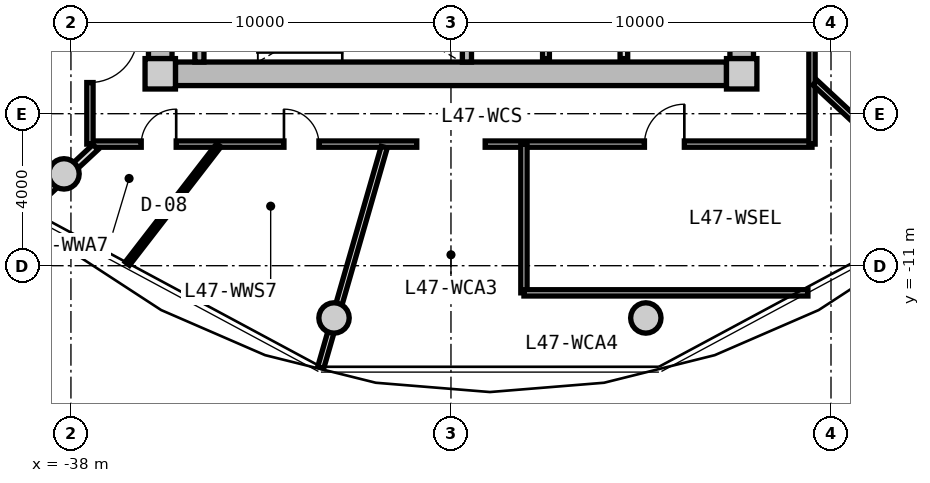
"""IFC4 building model, lengths in metres.
Left out: names, types, materials, properties, quantities, classifications, styles, units other than length and angle.
Written with IfcOpenShell. Run it as: python <this file> out.ifc"""

import sys

from ifc_helpers import new_model, si_unit, direction, frame, frame_2d, origin, origin_2d, place, context, subcontext, project, spatial, rectangle, circle, extrude, source, transform, mapped, element, fill, save


model = new_model("IFC4")
c1 = context("Model", 3, precision=1e-05, world=origin(), true_north=direction((0.0, 1.0)))
c2 = subcontext(c1, "Body", "Model", "MODEL_VIEW")
j1 = project(units=[si_unit("LENGTHUNIT", "METRE"), si_unit("PLANEANGLEUNIT", "RADIAN")], contexts=[c1])
p1 = place(None, origin())
s1 = spatial("IfcSite", under=j1, at=p1, CompositionType="ELEMENT")
p2 = place(p1, origin())
s2 = spatial("IfcBuilding", under=s1, at=p2, CompositionType="ELEMENT")
p3 = place(p2, frame((0.0, 0.0, 152.6)))
s3 = spatial("IfcBuildingStorey", under=s2, at=p3, CompositionType="ELEMENT", Elevation=152.6)
m1 = source(origin(), c2, "Body", "SweptSolid", [
    extrude(rectangle(XDim=0.8, YDim=0.8, at=origin_2d()), origin(), (0.0, 0.0, 1.0), 3.05),
])
for number, where, z_axis, x_axis in (
    (1, (-35.65, -5.95, 0.0), (0.0, 0.0, 1.0), (1.0, 0.0, 0.0)),
    (2, (-20.35, -5.95, 0.0), (0.0, 0.0, 1.0), (1.0, 0.0, 0.0)),
):
    element("IfcColumn", number, at=place(p3, frame(where, z_axis=z_axis, x_axis=x_axis)), inside=s3, PredefinedType="COLUMN", context=c2, shape_type="MappedRepresentation", body=[
        mapped(m1, transform((0.0, 0.0, 0.0), x_axis=(1.0, 0.0, 0.0), y_axis=(0.0, 1.0, 0.0), z_axis=(0.0, 0.0, 1.0), scale=1.0)),
    ])
m2 = source(origin(), c2, "Body", "SweptSolid", [
    extrude(rectangle(XDim=14.5, YDim=0.62, at=frame_2d((7.25, 0.0))), origin(), (0.0, 0.0, 1.0), 2.81),
])
p4 = place(p3, frame((-20.75, -5.95, 0.0), z_axis=(0.0, 0.0, 1.0), x_axis=(-1.0, 0.0, 0.0)))
e3 = element("IfcWall", 3, at=p4, inside=s3, PredefinedType="SHEAR", context=c2, shape_type="MappedRepresentation", body=[
    mapped(m2, transform((0.0, 0.0, 0.0), x_axis=(1.0, 0.0, 0.0), y_axis=(0.0, 1.0, 0.0), z_axis=(0.0, 0.0, 1.0), scale=1.0)),
])
m3 = source(origin(), c2, "Body", "SweptSolid", [
    extrude(rectangle(XDim=11.1, YDim=0.62, at=frame_2d((5.55, 0.0))), origin(), (0.0, 0.0, 1.0), 2.81),
])
p5 = place(p3, frame((-35.65, -5.55, 0.0), z_axis=(0.0, 0.0, 1.0), x_axis=(0.0, 1.0, 0.0)))
e4 = element("IfcWall", 4, at=p5, inside=s3, PredefinedType="SHEAR", context=c2, shape_type="MappedRepresentation", body=[
    mapped(m3, transform((0.0, 0.0, 0.0), x_axis=(1.0, 0.0, 0.0), y_axis=(0.0, 1.0, 0.0), z_axis=(0.0, 0.0, 1.0), scale=1.0)),
])
p6 = place(p5, frame((3.8, 0.0, 0.0)))
e5 = element("IfcOpeningElement", 5, at=p6, cuts=e4, PredefinedType="OPENING", context=c2, shape_type="SweptSolid", body=[
    extrude(rectangle(XDim=1.2, YDim=2.15, at=frame_2d((0.6, 1.075))), frame((0.0, 0.32, 0.0), z_axis=(0.0, -1.0, 0.0), x_axis=(1.0, 0.0, 0.0)), (0.0, 0.0, 1.0), 0.64),
])
p7 = place(p3, frame((-20.35, 5.55, 0.0), z_axis=(0.0, 0.0, 1.0), x_axis=(0.0, -1.0, 0.0)))
e6 = element("IfcWall", 6, at=p7, inside=s3, PredefinedType="SHEAR", context=c2, shape_type="MappedRepresentation", body=[
    mapped(m3, transform((0.0, 0.0, 0.0), x_axis=(1.0, 0.0, 0.0), y_axis=(0.0, 1.0, 0.0), z_axis=(0.0, 0.0, 1.0), scale=1.0)),
])
p8 = place(p7, frame((5.65, 0.0, 0.0)))
e7 = element("IfcOpeningElement", 7, at=p8, cuts=e6, PredefinedType="OPENING", context=c2, shape_type="SweptSolid", body=[
    extrude(rectangle(XDim=1.2, YDim=2.15, at=frame_2d((0.6, 1.075))), frame((0.0, 0.32, 0.0), z_axis=(0.0, -1.0, 0.0), x_axis=(1.0, 0.0, 0.0)), (0.0, 0.0, 1.0), 0.64),
])
p9 = place(p7, frame((9.3, 0.0, 0.0)))
e8 = element("IfcOpeningElement", 8, at=p9, cuts=e6, PredefinedType="OPENING", context=c2, shape_type="SweptSolid", body=[
    extrude(rectangle(XDim=1.0, YDim=2.1, at=frame_2d((0.5, 1.05))), frame((0.0, 0.32, 0.0), z_axis=(0.0, -1.0, 0.0), x_axis=(1.0, 0.0, 0.0)), (0.0, 0.0, 1.0), 0.64),
])
m4 = source(origin(), c2, "Body", "SweptSolid", [
    extrude(circle(Radius=0.4, at=origin_2d()), origin(), (0.0, 0.0, 1.0), 3.05),
])
for number, where, z_axis, x_axis in (
    (9, (-38.183, -8.584, 0.0), (0.0, 0.0, 1.0), (1.0, 0.0, 0.0)),
    (10, (-31.077, -12.375, 0.0), (0.0, 0.0, 1.0), (1.0, 0.0, 0.0)),
    (11, (-22.873, -12.375, 0.0), (0.0, 0.0, 1.0), (1.0, 0.0, 0.0)),
):
    element("IfcColumn", number, at=place(p3, frame(where, z_axis=z_axis, x_axis=x_axis)), inside=s3, PredefinedType="COLUMN", context=c2, shape_type="MappedRepresentation", body=[
        mapped(m4, transform((0.0, 0.0, 0.0), x_axis=(1.0, 0.0, 0.0), y_axis=(0.0, 1.0, 0.0), z_axis=(0.0, 0.0, 1.0), scale=1.0)),
    ])
m5 = source(origin(), c2, "Body", "SweptSolid", [
    extrude(rectangle(XDim=3.19, YDim=0.24, at=frame_2d((1.595, 0.0))), origin(), (0.0, 0.0, 1.0), 2.81),
])
for number, where, z_axis, x_axis in (
    (12, (-34.62, -5.64, 0.0), (0.0, 0.0, 1.0), (0.0, 1.0, 0.0)),
    (13, (-27.58, -5.64, 0.0), (0.0, 0.0, 1.0), (0.0, 1.0, 0.0)),
):
    element("IfcWall", number, at=place(p3, frame(where, z_axis=z_axis, x_axis=x_axis)), inside=s3, PredefinedType="PARTITIONING", context=c2, shape_type="MappedRepresentation", body=[
        mapped(m5, transform((0.0, 0.0, 0.0), x_axis=(1.0, 0.0, 0.0), y_axis=(0.0, 1.0, 0.0), z_axis=(0.0, 0.0, 1.0), scale=1.0)),
    ])
m6 = source(origin(), c2, "Body", "SweptSolid", [
    extrude(rectangle(XDim=3.8, YDim=0.2, at=frame_2d((1.9, 0.0))), origin(), (0.0, 0.0, 1.0), 2.795),
])
p10 = place(p3, frame((-23.45, -5.55, 0.0), z_axis=(0.0, 0.0, 1.0), x_axis=(0.0, 1.0, 0.0)))
e14 = element("IfcWall", 14, at=p10, inside=s3, PredefinedType="PARTITIONING", context=c2, shape_type="MappedRepresentation", body=[
    mapped(m6, transform((0.0, 0.0, 0.0), x_axis=(1.0, 0.0, 0.0), y_axis=(0.0, 1.0, 0.0), z_axis=(0.0, 0.0, 1.0), scale=1.0)),
])
m7 = source(origin(), c2, "Body", "SweptSolid", [
    extrude(rectangle(XDim=3.22, YDim=0.18, at=frame_2d((1.61, 0.0))), origin(), (0.0, 0.0, 1.0), 2.795),
])
p11 = place(p3, frame((-25.5, -5.55, 0.0), z_axis=(0.0, 0.0, 1.0), x_axis=(0.0, 1.0, 0.0)))
e15 = element("IfcWall", 15, at=p11, inside=s3, PredefinedType="PARTITIONING", context=c2, shape_type="MappedRepresentation", body=[
    mapped(m7, transform((0.0, 0.0, 0.0), x_axis=(1.0, 0.0, 0.0), y_axis=(0.0, 1.0, 0.0), z_axis=(0.0, 0.0, 1.0), scale=1.0)),
])
m8 = source(origin(), c2, "Body", "SweptSolid", [
    extrude(rectangle(XDim=8.6, YDim=0.165, at=frame_2d((4.3, 0.0))), origin(), (0.0, 0.0, 1.0), 2.795),
])
p12 = place(p3, frame((-18.5, -7.8, 0.0), z_axis=(0.0, 0.0, 1.0), x_axis=(-1.0, 0.0, 0.0)))
e16 = element("IfcWall", 16, at=p12, inside=s3, PredefinedType="PARTITIONING", context=c2, shape_type="MappedRepresentation", body=[
    mapped(m8, transform((0.0, 0.0, 0.0), x_axis=(1.0, 0.0, 0.0), y_axis=(0.0, 1.0, 0.0), z_axis=(0.0, 0.0, 1.0), scale=1.0)),
])
p13 = place(p12, frame((3.359, 0.0, 0.0)))
e17 = element("IfcOpeningElement", 17, at=p13, cuts=e16, PredefinedType="OPENING", context=c2, shape_type="SweptSolid", body=[
    extrude(rectangle(XDim=1.05, YDim=2.15, at=frame_2d((0.525, 1.075))), frame((0.0, 0.093, 0.0), z_axis=(0.0, -1.0, 0.0), x_axis=(1.0, 0.0, 0.0)), (0.0, 0.0, 1.0), 0.185),
])
p14 = place(p3, frame((-28.9, -7.8, 0.0), z_axis=(0.0, 0.0, 1.0), x_axis=(-1.0, 0.0, 0.0)))
e18 = element("IfcWall", 18, at=p14, inside=s3, PredefinedType="PARTITIONING", context=c2, shape_type="MappedRepresentation", body=[
    mapped(m8, transform((0.0, 0.0, 0.0), x_axis=(1.0, 0.0, 0.0), y_axis=(0.0, 1.0, 0.0), z_axis=(0.0, 0.0, 1.0), scale=1.0)),
])
p15 = place(p14, frame((6.33, 0.0, 0.0)))
e19 = element("IfcOpeningElement", 19, at=p15, cuts=e18, PredefinedType="OPENING", context=c2, shape_type="SweptSolid", body=[
    extrude(rectangle(XDim=0.92, YDim=2.1, at=frame_2d((0.46, 1.05))), frame((0.0, 0.093, 0.0), z_axis=(0.0, -1.0, 0.0), x_axis=(1.0, 0.0, 0.0)), (0.0, 0.0, 1.0), 0.185),
])
p16 = place(p14, frame((2.575, 0.0, 0.0)))
e20 = element("IfcOpeningElement", 20, at=p16, cuts=e18, PredefinedType="OPENING", context=c2, shape_type="SweptSolid", body=[
    extrude(rectangle(XDim=0.92, YDim=2.1, at=frame_2d((0.46, 1.05))), frame((0.0, 0.093, 0.0), z_axis=(0.0, -1.0, 0.0), x_axis=(1.0, 0.0, 0.0)), (0.0, 0.0, 1.0), 0.185),
])
m9 = source(origin(), c2, "Body", "SweptSolid", [
    extrude(rectangle(XDim=15.6, YDim=0.165, at=frame_2d((7.8, 0.0))), origin(), (0.0, 0.0, 1.0), 2.795),
])
p17 = place(p3, frame((-37.5, -7.8, 0.0), z_axis=(0.0, 0.0, 1.0), x_axis=(0.0, 1.0, 0.0)))
e21 = element("IfcWall", 21, at=p17, inside=s3, PredefinedType="PARTITIONING", context=c2, shape_type="MappedRepresentation", body=[
    mapped(m9, transform((0.0, 0.0, 0.0), x_axis=(1.0, 0.0, 0.0), y_axis=(0.0, 1.0, 0.0), z_axis=(0.0, 0.0, 1.0), scale=1.0)),
])
p18 = place(p17, frame((13.16, 0.0, 0.0)))
e22 = element("IfcOpeningElement", 22, at=p18, cuts=e21, PredefinedType="OPENING", context=c2, shape_type="SweptSolid", body=[
    extrude(rectangle(XDim=1.25, YDim=2.2, at=frame_2d((0.625, 1.1))), frame((0.0, 0.093, 0.0), z_axis=(0.0, -1.0, 0.0), x_axis=(1.0, 0.0, 0.0)), (0.0, 0.0, 1.0), 0.185),
])
p19 = place(p17, frame((7.757, 0.0, 0.0)))
e23 = element("IfcOpeningElement", 23, at=p19, cuts=e21, PredefinedType="OPENING", context=c2, shape_type="SweptSolid", body=[
    extrude(rectangle(XDim=1.25, YDim=2.2, at=frame_2d((0.625, 1.1))), frame((0.0, 0.093, 0.0), z_axis=(0.0, -1.0, 0.0), x_axis=(1.0, 0.0, 0.0)), (0.0, 0.0, 1.0), 0.185),
])
p20 = place(p17, frame((1.62, 0.0, 0.0)))
e24 = element("IfcOpeningElement", 24, at=p20, cuts=e21, PredefinedType="OPENING", context=c2, shape_type="SweptSolid", body=[
    extrude(rectangle(XDim=1.25, YDim=2.2, at=frame_2d((0.625, 1.1))), frame((0.0, 0.093, 0.0), z_axis=(0.0, -1.0, 0.0), x_axis=(1.0, 0.0, 0.0)), (0.0, 0.0, 1.0), 0.185),
])
p21 = place(p3, frame((-18.5, 7.8, 0.0), z_axis=(0.0, 0.0, 1.0), x_axis=(0.0, -1.0, 0.0)))
e25 = element("IfcWall", 25, at=p21, inside=s3, PredefinedType="PARTITIONING", context=c2, shape_type="MappedRepresentation", body=[
    mapped(m9, transform((0.0, 0.0, 0.0), x_axis=(1.0, 0.0, 0.0), y_axis=(0.0, 1.0, 0.0), z_axis=(0.0, 0.0, 1.0), scale=1.0)),
])
p22 = place(p21, frame((8.314, 0.0, 0.0)))
e26 = element("IfcOpeningElement", 26, at=p22, cuts=e25, PredefinedType="OPENING", context=c2, shape_type="SweptSolid", body=[
    extrude(rectangle(XDim=1.25, YDim=2.2, at=frame_2d((0.625, 1.1))), frame((0.0, 0.093, 0.0), z_axis=(0.0, -1.0, 0.0), x_axis=(1.0, 0.0, 0.0)), (0.0, 0.0, 1.0), 0.185),
])
p23 = place(p21, frame((1.515, 0.0, 0.0)))
e27 = element("IfcOpeningElement", 27, at=p23, cuts=e25, PredefinedType="OPENING", context=c2, shape_type="SweptSolid", body=[
    extrude(rectangle(XDim=1.05, YDim=2.15, at=frame_2d((0.525, 1.075))), frame((0.0, 0.093, 0.0), z_axis=(0.0, -1.0, 0.0), x_axis=(1.0, 0.0, 0.0)), (0.0, 0.0, 1.0), 0.185),
])
m10 = source(origin(), c2, "Body", "SweptSolid", [
    extrude(rectangle(XDim=6.035, YDim=0.165, at=frame_2d((3.018, 0.0))), origin(), (0.0, 0.0, 1.0), 2.345),
])
p24 = place(p3, frame((-29.756, -7.88, 0.0), z_axis=(0.0, 0.0, 1.0), x_axis=(-0.276809454862, -0.960924828329, 0.0)))
e28 = element("IfcWall", 28, at=p24, inside=s3, PredefinedType="PARTITIONING", context=c2, shape_type="MappedRepresentation", body=[
    mapped(m10, transform((0.0, 0.0, 0.0), x_axis=(1.0, 0.0, 0.0), y_axis=(0.0, 1.0, 0.0), z_axis=(0.0, 0.0, 1.0), scale=1.0)),
])
m11 = source(origin(), c2, "Body", "SweptSolid", [
    extrude(rectangle(XDim=4.927, YDim=0.165, at=frame_2d((2.463, 0.0))), origin(), (0.0, 0.0, 1.0), 2.345),
])
p25 = place(p3, frame((-18.42, -6.183, 0.0), z_axis=(0.0, 0.0, 1.0), x_axis=(0.732191335987, -0.681098999783, 0.0)))
e29 = element("IfcWall", 29, at=p25, inside=s3, PredefinedType="PARTITIONING", context=c2, shape_type="MappedRepresentation", body=[
    mapped(m11, transform((0.0, 0.0, 0.0), x_axis=(1.0, 0.0, 0.0), y_axis=(0.0, 1.0, 0.0), z_axis=(0.0, 0.0, 1.0), scale=1.0)),
])
m12 = source(origin(), c2, "Body", "SweptSolid", [
    extrude(rectangle(XDim=3.915, YDim=0.165, at=frame_2d((1.957, 0.0))), origin(), (0.0, 0.0, 1.0), 2.795),
])
p26 = place(p3, frame((-26.08, -11.715, 0.0), z_axis=(0.0, 0.0, 1.0), x_axis=(0.0, 1.0, 0.0)))
e30 = element("IfcWall", 30, at=p26, inside=s3, PredefinedType="PARTITIONING", context=c2, shape_type="MappedRepresentation", body=[
    mapped(m12, transform((0.0, 0.0, 0.0), x_axis=(1.0, 0.0, 0.0), y_axis=(0.0, 1.0, 0.0), z_axis=(0.0, 0.0, 1.0), scale=1.0)),
])
m13 = source(origin(), c2, "Body", "SweptSolid", [
    extrude(rectangle(XDim=7.473, YDim=0.165, at=frame_2d((3.737, 0.0))), origin(), (0.0, 0.0, 1.0), 2.795),
])
p27 = place(p3, frame((-26.08, -11.715, 0.0), z_axis=(0.0, 0.0, 1.0), x_axis=(1.0, 0.0, 0.0)))
e31 = element("IfcWall", 31, at=p27, inside=s3, PredefinedType="PARTITIONING", context=c2, shape_type="MappedRepresentation", body=[
    mapped(m13, transform((0.0, 0.0, 0.0), x_axis=(1.0, 0.0, 0.0), y_axis=(0.0, 1.0, 0.0), z_axis=(0.0, 0.0, 1.0), scale=1.0)),
])
m14 = source(origin(), c2, "Body", "SweptSolid", [
    extrude(rectangle(XDim=2.435, YDim=0.19, at=frame_2d((1.217, 0.0))), origin(), (0.0, 0.0, 1.0), 2.345),
])
p28 = place(p3, frame((-37.354, -7.88, 0.0), z_axis=(0.0, 0.0, 1.0), x_axis=(-0.732164643118, -0.681127693878, 0.0)))
e32 = element("IfcWall", 32, at=p28, inside=s3, PredefinedType="PARTITIONING", context=c2, shape_type="MappedRepresentation", body=[
    mapped(m14, transform((0.0, 0.0, 0.0), x_axis=(1.0, 0.0, 0.0), y_axis=(0.0, 1.0, 0.0), z_axis=(0.0, 0.0, 1.0), scale=1.0)),
])
m15 = source(origin(), c2, "Body", "SweptSolid", [
    extrude(rectangle(XDim=3.937, YDim=0.14, at=frame_2d((1.968, 0.0))), origin(), (0.0, 0.0, 1.0), 2.795),
])
p29 = place(p3, frame((-34.11, -7.83, 0.0), z_axis=(0.0, 0.0, 1.0), x_axis=(-0.611016723561, -0.791617687731, 0.0)))
e33 = element("IfcWall", 33, at=p29, inside=s3, PredefinedType="PARTITIONING", context=c2, shape_type="MappedRepresentation", body=[
    mapped(m15, transform((0.0, 0.0, 0.0), x_axis=(1.0, 0.0, 0.0), y_axis=(0.0, 1.0, 0.0), z_axis=(0.0, 0.0, 1.0), scale=1.0)),
])
m16 = source(origin(), c2, "Body", "SweptSolid", [
    extrude(rectangle(XDim=1.05, YDim=2.15, at=frame_2d((0.525, 1.075))), frame((0.0, 0.025, 0.0), z_axis=(0.0, -1.0, 0.0), x_axis=(1.0, 0.0, 0.0)), (0.0, 0.0, 1.0), 0.05),
])
p30 = place(p13, frame((1.05, 0.0, 0.0), z_axis=(0.0, 0.0, 1.0), x_axis=(-1.0, 0.0, 0.0)))
e34 = element("IfcDoor", 34, at=p30, inside=s3, OperationType="SINGLE_SWING_RIGHT", PredefinedType="DOOR", context=c2, shape_type="MappedRepresentation", body=[
    mapped(m16, transform((0.0, 0.0, 0.0), x_axis=(1.0, 0.0, 0.0), y_axis=(0.0, 1.0, 0.0), z_axis=(0.0, 0.0, 1.0), scale=1.0)),
])
fill(e17, e34)
m17 = source(origin(), c2, "Body", "SweptSolid", [
    extrude(rectangle(XDim=1.25, YDim=2.2, at=frame_2d((0.625, 1.1))), frame((0.0, 0.025, 0.0), z_axis=(0.0, -1.0, 0.0), x_axis=(1.0, 0.0, 0.0)), (0.0, 0.0, 1.0), 0.05),
])
p31 = place(p20, frame((1.25, 0.0, 0.0), z_axis=(0.0, 0.0, 1.0), x_axis=(-1.0, 0.0, 0.0)))
e35 = element("IfcDoor", 35, at=p31, inside=s3, OperationType="SINGLE_SWING_LEFT", PredefinedType="DOOR", context=c2, shape_type="MappedRepresentation", body=[
    mapped(m17, transform((0.0, 0.0, 0.0), x_axis=(1.0, 0.0, 0.0), y_axis=(0.0, 1.0, 0.0), z_axis=(0.0, 0.0, 1.0), scale=1.0)),
])
fill(e24, e35)
m18 = source(origin(), c2, "Body", "SweptSolid", [
    extrude(rectangle(XDim=0.92, YDim=2.1, at=frame_2d((0.46, 1.05))), frame((0.0, 0.025, 0.0), z_axis=(0.0, -1.0, 0.0), x_axis=(1.0, 0.0, 0.0)), (0.0, 0.0, 1.0), 0.05),
])
p32 = place(p15, frame((0.92, 0.0, 0.0), z_axis=(0.0, 0.0, 1.0), x_axis=(-1.0, 0.0, 0.0)))
e36 = element("IfcDoor", 36, at=p32, inside=s3, OperationType="SINGLE_SWING_RIGHT", PredefinedType="DOOR", context=c2, shape_type="MappedRepresentation", body=[
    mapped(m18, transform((0.0, 0.0, 0.0), x_axis=(1.0, 0.0, 0.0), y_axis=(0.0, 1.0, 0.0), z_axis=(0.0, 0.0, 1.0), scale=1.0)),
])
fill(e19, e36)
p33 = place(p16, frame((0.92, 0.0, 0.0), z_axis=(0.0, 0.0, 1.0), x_axis=(-1.0, 0.0, 0.0)))
e37 = element("IfcDoor", 37, at=p33, inside=s3, OperationType="SINGLE_SWING_LEFT", PredefinedType="DOOR", context=c2, shape_type="MappedRepresentation", body=[
    mapped(m18, transform((0.0, 0.0, 0.0), x_axis=(1.0, 0.0, 0.0), y_axis=(0.0, 1.0, 0.0), z_axis=(0.0, 0.0, 1.0), scale=1.0)),
])
fill(e20, e37)
save(model, sys.argv[1])
